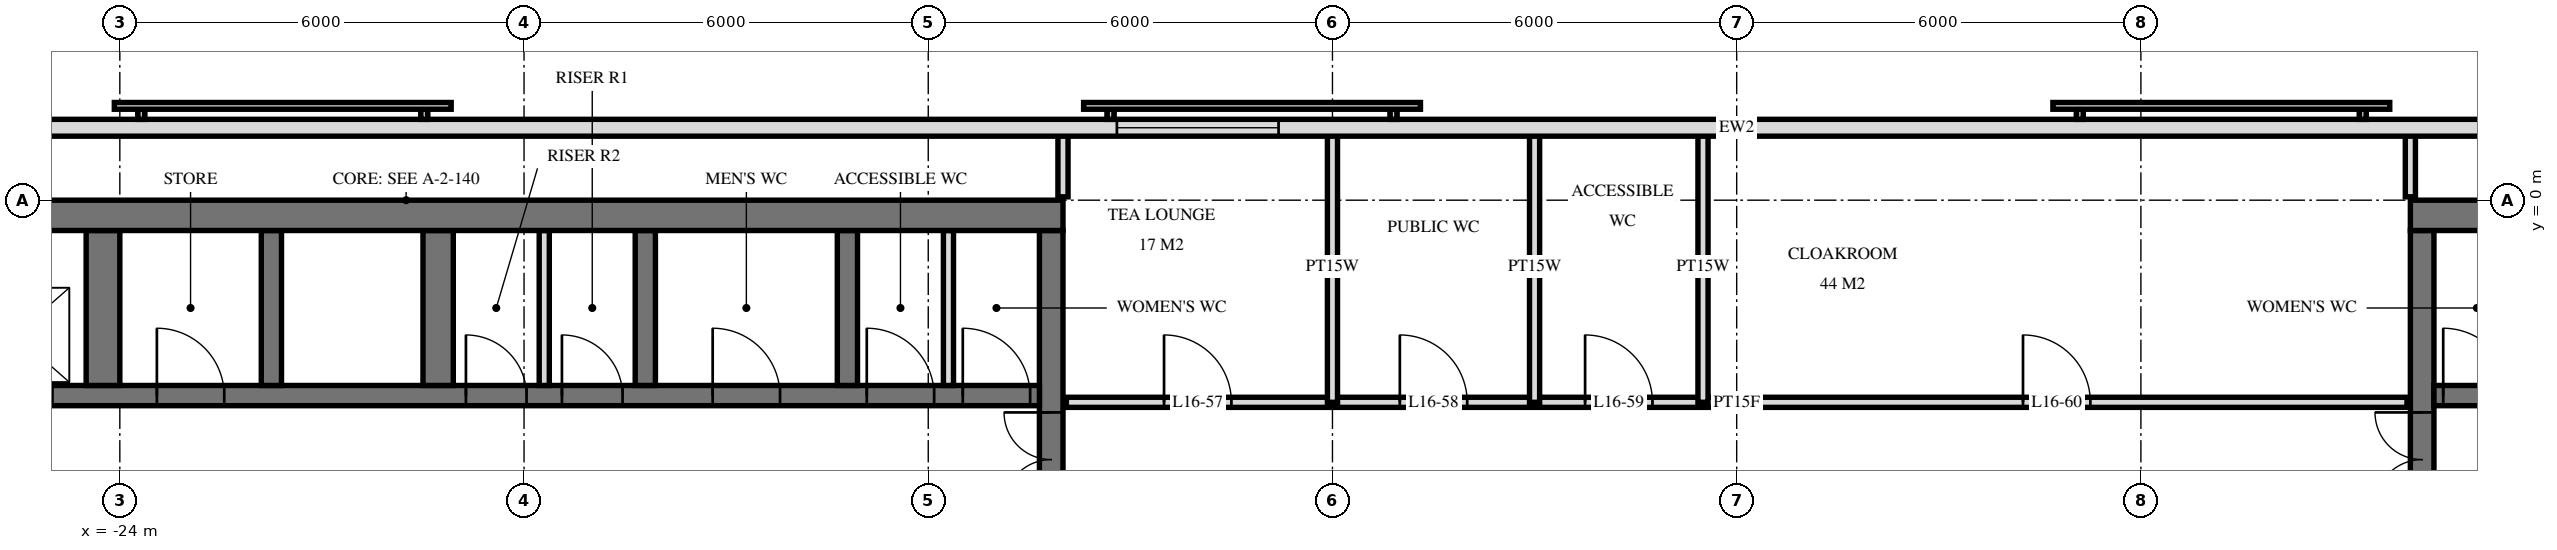
"""IFC4 building model, lengths in metres.
Left out: names, types, materials, properties, quantities, classifications, styles, units other than length and angle.
Written with IfcOpenShell. Run it as: python <this file> out.ifc"""

import sys

from ifc_helpers import new_model, si_unit, direction, frame, frame_2d, origin, place, context, subcontext, project, spatial, rectangle, extrude, element, fill, save


model = new_model("IFC4")
c1 = context("Model", 3, precision=1e-05, world=origin(), true_north=direction((0.0, 1.0)))
c2 = subcontext(c1, "Body", "Model", "MODEL_VIEW")
j1 = project(units=[si_unit("LENGTHUNIT", "METRE"), si_unit("PLANEANGLEUNIT", "RADIAN")], contexts=[c1])
p1 = place(None, origin())
s1 = spatial("IfcSite", under=j1, at=p1, CompositionType="ELEMENT")
p2 = place(p1, origin())
s2 = spatial("IfcBuilding", under=s1, at=p2, CompositionType="ELEMENT")
p3 = place(p2, frame((0.0, 0.0, 67.2)))
s3 = spatial("IfcBuildingStorey", under=s2, at=p3, CompositionType="ELEMENT", Elevation=67.2)
p4 = place(p3, frame((-29.5, -0.225, 0.0), z_axis=(0.0, 0.0, 1.0), x_axis=(1.0, 0.0, 0.0)))
e1 = element("IfcWall", 1, at=p4, inside=s3, PredefinedType="SHEAR", context=c2, shape_type="SweptSolid", body=[
    extrude(rectangle(XDim=19.5, YDim=0.45, at=frame_2d((9.75, 0.0))), origin(), (0.0, 0.0, 1.0), 3.6),
])
p5 = place(p3, frame((-10.175, -14.55, 0.0), z_axis=(0.0, 0.0, 1.0), x_axis=(0.0, 1.0, 0.0)))
e2 = element("IfcWall", 2, at=p5, inside=s3, PredefinedType="SHEAR", context=c2, shape_type="SweptSolid", body=[
    extrude(rectangle(XDim=14.1, YDim=0.35, at=frame_2d((7.05, 0.0))), origin(), (0.0, 0.0, 1.0), 3.6),
])
p6 = place(p5, frame((8.4, 0.0, 0.0)))
e3 = element("IfcOpeningElement", 3, at=p6, cuts=e2, PredefinedType="OPENING", context=c2, shape_type="SweptSolid", body=[
    extrude(rectangle(XDim=1.4, YDim=2.4, at=frame_2d((0.7, 1.2))), frame((0.0, 0.185, 0.0), z_axis=(0.0, -1.0, 0.0), x_axis=(1.0, 0.0, 0.0)), (0.0, 0.0, 1.0), 0.37),
])
p7 = place(p5, frame((10.0, 0.0, 0.0)))
e4 = element("IfcOpeningElement", 4, at=p7, cuts=e2, PredefinedType="OPENING", context=c2, shape_type="SweptSolid", body=[
    extrude(rectangle(XDim=1.4, YDim=2.4, at=frame_2d((0.7, 1.2))), frame((0.0, 0.185, 0.0), z_axis=(0.0, -1.0, 0.0), x_axis=(1.0, 0.0, 0.0)), (0.0, 0.0, 1.0), 0.37),
])
p8 = place(p5, frame((4.0, 0.0, 0.0)))
e5 = element("IfcOpeningElement", 5, at=p8, cuts=e2, PredefinedType="OPENING", context=c2, shape_type="SweptSolid", body=[
    extrude(rectangle(XDim=1.2, YDim=2.1, at=frame_2d((0.6, 1.05))), frame((0.0, 0.185, 0.0), z_axis=(0.0, -1.0, 0.0), x_axis=(1.0, 0.0, 0.0)), (0.0, 0.0, 1.0), 0.37),
])
p9 = place(p3, frame((-29.05, -2.9, 0.0), z_axis=(0.0, 0.0, 1.0), x_axis=(1.0, 0.0, 0.0)))
e6 = element("IfcWall", 6, at=p9, inside=s3, PredefinedType="SHEAR", context=c2, shape_type="SweptSolid", body=[
    extrude(rectangle(XDim=18.7, YDim=0.3, at=frame_2d((9.35, 0.0))), origin(), (0.0, 0.0, 1.0), 3.6),
])
p10 = place(p9, frame((2.95, 0.0, 0.0)))
e7 = element("IfcOpeningElement", 7, at=p10, cuts=e6, PredefinedType="OPENING", context=c2, shape_type="SweptSolid", body=[
    extrude(rectangle(XDim=1.1, YDim=2.1, at=frame_2d((0.55, 1.05))), frame((0.0, 0.16, 0.0), z_axis=(0.0, -1.0, 0.0), x_axis=(1.0, 0.0, 0.0)), (0.0, 0.0, 1.0), 0.32),
])
p11 = place(p9, frame((0.55, 0.0, 0.0)))
e8 = element("IfcOpeningElement", 8, at=p11, cuts=e6, PredefinedType="OPENING", context=c2, shape_type="SweptSolid", body=[
    extrude(rectangle(XDim=1.1, YDim=2.1, at=frame_2d((0.55, 1.05))), frame((0.0, 0.16, 0.0), z_axis=(0.0, -1.0, 0.0), x_axis=(1.0, 0.0, 0.0)), (0.0, 0.0, 1.0), 0.32),
])
p12 = place(p9, frame((11.613, 0.0, 0.0)))
e9 = element("IfcOpeningElement", 9, at=p12, cuts=e6, PredefinedType="OPENING", context=c2, shape_type="SweptSolid", body=[
    extrude(rectangle(XDim=0.9, YDim=2.1, at=frame_2d((0.45, 1.05))), frame((0.0, 0.16, 0.0), z_axis=(0.0, -1.0, 0.0), x_axis=(1.0, 0.0, 0.0)), (0.0, 0.0, 1.0), 0.32),
])
p13 = place(p9, frame((10.188, 0.0, 0.0)))
e10 = element("IfcOpeningElement", 10, at=p13, cuts=e6, PredefinedType="OPENING", context=c2, shape_type="SweptSolid", body=[
    extrude(rectangle(XDim=0.9, YDim=2.1, at=frame_2d((0.45, 1.05))), frame((0.0, 0.16, 0.0), z_axis=(0.0, -1.0, 0.0), x_axis=(1.0, 0.0, 0.0)), (0.0, 0.0, 1.0), 0.32),
])
p14 = place(p9, frame((17.562, 0.0, 0.0)))
e11 = element("IfcOpeningElement", 11, at=p14, cuts=e6, PredefinedType="OPENING", context=c2, shape_type="SweptSolid", body=[
    extrude(rectangle(XDim=1.0, YDim=2.1, at=frame_2d((0.5, 1.05))), frame((0.0, 0.16, 0.0), z_axis=(0.0, -1.0, 0.0), x_axis=(1.0, 0.0, 0.0)), (0.0, 0.0, 1.0), 0.32),
])
p15 = place(p9, frame((16.137, 0.0, 0.0)))
e12 = element("IfcOpeningElement", 12, at=p15, cuts=e6, PredefinedType="OPENING", context=c2, shape_type="SweptSolid", body=[
    extrude(rectangle(XDim=1.0, YDim=2.1, at=frame_2d((0.5, 1.05))), frame((0.0, 0.16, 0.0), z_axis=(0.0, -1.0, 0.0), x_axis=(1.0, 0.0, 0.0)), (0.0, 0.0, 1.0), 0.32),
])
p16 = place(p9, frame((13.85, 0.0, 0.0)))
e13 = element("IfcOpeningElement", 13, at=p16, cuts=e6, PredefinedType="OPENING", context=c2, shape_type="SweptSolid", body=[
    extrude(rectangle(XDim=1.0, YDim=2.1, at=frame_2d((0.5, 1.05))), frame((0.0, 0.16, 0.0), z_axis=(0.0, -1.0, 0.0), x_axis=(1.0, 0.0, 0.0)), (0.0, 0.0, 1.0), 0.32),
])
p17 = place(p9, frame((5.6, 0.0, 0.0)))
e14 = element("IfcOpeningElement", 14, at=p17, cuts=e6, PredefinedType="OPENING", context=c2, shape_type="SweptSolid", body=[
    extrude(rectangle(XDim=1.0, YDim=2.1, at=frame_2d((0.5, 1.05))), frame((0.0, 0.16, 0.0), z_axis=(0.0, -1.0, 0.0), x_axis=(1.0, 0.0, 0.0)), (0.0, 0.0, 1.0), 0.32),
])
for number, where, z_axis, x_axis in (
    (15, (-13.2, -2.75, 0.0), (0.0, 0.0, 1.0), (0.0, 1.0, 0.0)),
    (16, (-16.2, -2.75, 0.0), (0.0, 0.0, 1.0), (0.0, 1.0, 0.0)),
):
    element("IfcWall", number, at=place(p3, frame(where, z_axis=z_axis, x_axis=x_axis)), inside=s3, PredefinedType="SHEAR", context=c2, shape_type="SweptSolid", body=[
        extrude(rectangle(XDim=2.3, YDim=0.3, at=frame_2d((1.15, 0.0))), origin(), (0.0, 0.0, 1.0), 3.6),
    ])
p18 = place(p3, frame((-19.275, -2.75, 0.0), z_axis=(0.0, 0.0, 1.0), x_axis=(0.0, 1.0, 0.0)))
e17 = element("IfcWall", 17, at=p18, inside=s3, PredefinedType="SHEAR", context=c2, shape_type="SweptSolid", body=[
    extrude(rectangle(XDim=2.3, YDim=0.45, at=frame_2d((1.15, 0.0))), origin(), (0.0, 0.0, 1.0), 3.6),
])
p19 = place(p3, frame((-21.75, -2.75, 0.0), z_axis=(0.0, 0.0, 1.0), x_axis=(0.0, 1.0, 0.0)))
e18 = element("IfcWall", 18, at=p19, inside=s3, PredefinedType="SHEAR", context=c2, shape_type="SweptSolid", body=[
    extrude(rectangle(XDim=2.3, YDim=0.3, at=frame_2d((1.15, 0.0))), origin(), (0.0, 0.0, 1.0), 3.6),
])
p20 = place(p3, frame((-24.25, -2.75, 0.0), z_axis=(0.0, 0.0, 1.0), x_axis=(0.0, 1.0, 0.0)))
e19 = element("IfcWall", 19, at=p20, inside=s3, PredefinedType="SHEAR", context=c2, shape_type="SweptSolid", body=[
    extrude(rectangle(XDim=2.3, YDim=0.5, at=frame_2d((1.15, 0.0))), origin(), (0.0, 0.0, 1.0), 3.6),
])
p21 = place(p3, frame((10.0, -0.225, 0.0), z_axis=(0.0, 0.0, 1.0), x_axis=(1.0, 0.0, 0.0)))
e20 = element("IfcWall", 20, at=p21, inside=s3, PredefinedType="SHEAR", context=c2, shape_type="SweptSolid", body=[
    extrude(rectangle(XDim=19.5, YDim=0.45, at=frame_2d((9.75, 0.0))), origin(), (0.0, 0.0, 1.0), 3.6),
])
p22 = place(p3, frame((10.175, -14.55, 0.0), z_axis=(0.0, 0.0, 1.0), x_axis=(0.0, 1.0, 0.0)))
e21 = element("IfcWall", 21, at=p22, inside=s3, PredefinedType="SHEAR", context=c2, shape_type="SweptSolid", body=[
    extrude(rectangle(XDim=14.1, YDim=0.35, at=frame_2d((7.05, 0.0))), origin(), (0.0, 0.0, 1.0), 3.6),
])
p23 = place(p22, frame((8.4, 0.0, 0.0)))
e22 = element("IfcOpeningElement", 22, at=p23, cuts=e21, PredefinedType="OPENING", context=c2, shape_type="SweptSolid", body=[
    extrude(rectangle(XDim=1.4, YDim=2.4, at=frame_2d((0.7, 1.2))), frame((0.0, 0.185, 0.0), z_axis=(0.0, -1.0, 0.0), x_axis=(1.0, 0.0, 0.0)), (0.0, 0.0, 1.0), 0.37),
])
p24 = place(p22, frame((10.0, 0.0, 0.0)))
e23 = element("IfcOpeningElement", 23, at=p24, cuts=e21, PredefinedType="OPENING", context=c2, shape_type="SweptSolid", body=[
    extrude(rectangle(XDim=1.4, YDim=2.4, at=frame_2d((0.7, 1.2))), frame((0.0, 0.185, 0.0), z_axis=(0.0, -1.0, 0.0), x_axis=(1.0, 0.0, 0.0)), (0.0, 0.0, 1.0), 0.37),
])
p25 = place(p22, frame((4.0, 0.0, 0.0)))
e24 = element("IfcOpeningElement", 24, at=p25, cuts=e21, PredefinedType="OPENING", context=c2, shape_type="SweptSolid", body=[
    extrude(rectangle(XDim=1.2, YDim=2.1, at=frame_2d((0.6, 1.05))), frame((0.0, 0.185, 0.0), z_axis=(0.0, -1.0, 0.0), x_axis=(1.0, 0.0, 0.0)), (0.0, 0.0, 1.0), 0.37),
])
p26 = place(p3, frame((10.35, -2.9, 0.0), z_axis=(0.0, 0.0, 1.0), x_axis=(1.0, 0.0, 0.0)))
e25 = element("IfcWall", 25, at=p26, inside=s3, PredefinedType="SHEAR", context=c2, shape_type="SweptSolid", body=[
    extrude(rectangle(XDim=18.7, YDim=0.3, at=frame_2d((9.35, 0.0))), origin(), (0.0, 0.0, 1.0), 3.6),
])
p27 = place(p26, frame((14.65, 0.0, 0.0)))
e26 = element("IfcOpeningElement", 26, at=p27, cuts=e25, PredefinedType="OPENING", context=c2, shape_type="SweptSolid", body=[
    extrude(rectangle(XDim=1.1, YDim=2.1, at=frame_2d((0.55, 1.05))), frame((0.0, 0.16, 0.0), z_axis=(0.0, -1.0, 0.0), x_axis=(1.0, 0.0, 0.0)), (0.0, 0.0, 1.0), 0.32),
])
p28 = place(p26, frame((17.05, 0.0, 0.0)))
e27 = element("IfcOpeningElement", 27, at=p28, cuts=e25, PredefinedType="OPENING", context=c2, shape_type="SweptSolid", body=[
    extrude(rectangle(XDim=1.1, YDim=2.1, at=frame_2d((0.55, 1.05))), frame((0.0, 0.16, 0.0), z_axis=(0.0, -1.0, 0.0), x_axis=(1.0, 0.0, 0.0)), (0.0, 0.0, 1.0), 0.32),
])
p29 = place(p26, frame((6.188, 0.0, 0.0)))
e28 = element("IfcOpeningElement", 28, at=p29, cuts=e25, PredefinedType="OPENING", context=c2, shape_type="SweptSolid", body=[
    extrude(rectangle(XDim=0.9, YDim=2.1, at=frame_2d((0.45, 1.05))), frame((0.0, 0.16, 0.0), z_axis=(0.0, -1.0, 0.0), x_axis=(1.0, 0.0, 0.0)), (0.0, 0.0, 1.0), 0.32),
])
p30 = place(p26, frame((7.613, 0.0, 0.0)))
e29 = element("IfcOpeningElement", 29, at=p30, cuts=e25, PredefinedType="OPENING", context=c2, shape_type="SweptSolid", body=[
    extrude(rectangle(XDim=0.9, YDim=2.1, at=frame_2d((0.45, 1.05))), frame((0.0, 0.16, 0.0), z_axis=(0.0, -1.0, 0.0), x_axis=(1.0, 0.0, 0.0)), (0.0, 0.0, 1.0), 0.32),
])
p31 = place(p26, frame((0.137, 0.0, 0.0)))
e30 = element("IfcOpeningElement", 30, at=p31, cuts=e25, PredefinedType="OPENING", context=c2, shape_type="SweptSolid", body=[
    extrude(rectangle(XDim=1.0, YDim=2.1, at=frame_2d((0.5, 1.05))), frame((0.0, 0.16, 0.0), z_axis=(0.0, -1.0, 0.0), x_axis=(1.0, 0.0, 0.0)), (0.0, 0.0, 1.0), 0.32),
])
p32 = place(p26, frame((1.562, 0.0, 0.0)))
e31 = element("IfcOpeningElement", 31, at=p32, cuts=e25, PredefinedType="OPENING", context=c2, shape_type="SweptSolid", body=[
    extrude(rectangle(XDim=1.0, YDim=2.1, at=frame_2d((0.5, 1.05))), frame((0.0, 0.16, 0.0), z_axis=(0.0, -1.0, 0.0), x_axis=(1.0, 0.0, 0.0)), (0.0, 0.0, 1.0), 0.32),
])
p33 = place(p26, frame((3.85, 0.0, 0.0)))
e32 = element("IfcOpeningElement", 32, at=p33, cuts=e25, PredefinedType="OPENING", context=c2, shape_type="SweptSolid", body=[
    extrude(rectangle(XDim=1.0, YDim=2.1, at=frame_2d((0.5, 1.05))), frame((0.0, 0.16, 0.0), z_axis=(0.0, -1.0, 0.0), x_axis=(1.0, 0.0, 0.0)), (0.0, 0.0, 1.0), 0.32),
])
p34 = place(p26, frame((12.1, 0.0, 0.0)))
e33 = element("IfcOpeningElement", 33, at=p34, cuts=e25, PredefinedType="OPENING", context=c2, shape_type="SweptSolid", body=[
    extrude(rectangle(XDim=1.0, YDim=2.1, at=frame_2d((0.5, 1.05))), frame((0.0, 0.16, 0.0), z_axis=(0.0, -1.0, 0.0), x_axis=(1.0, 0.0, 0.0)), (0.0, 0.0, 1.0), 0.32),
])
p35 = place(p3, frame((28.775, 1.075, 0.0), z_axis=(0.0, 0.0, 1.0), x_axis=(-1.0, 0.0, 0.0)))
e34 = element("IfcWall", 34, at=p35, inside=s3, PredefinedType="SOLIDWALL", context=c2, shape_type="SweptSolid", body=[
    extrude(rectangle(XDim=57.551, YDim=0.25, at=frame_2d((28.775, 0.0))), origin(), (0.0, 0.0, 1.0), 3.32),
])
p36 = place(p35, frame((35.575, 0.0, 0.3)))
e35 = element("IfcOpeningElement", 35, at=p36, cuts=e34, PredefinedType="OPENING", context=c2, shape_type="SweptSolid", body=[
    extrude(rectangle(XDim=2.4, YDim=2.1, at=frame_2d((1.2, 1.05))), frame((0.0, 0.135, 0.0), z_axis=(0.0, -1.0, 0.0), x_axis=(1.0, 0.0, 0.0)), (0.0, 0.0, 1.0), 0.27),
])
for number, where, z_axis, x_axis in (
    (36, (-17.7, -2.75, 0.0), (0.0, 0.0, 1.0), (0.0, 1.0, 0.0)),
    (37, (-11.7, -2.75, 0.0), (0.0, 0.0, 1.0), (0.0, 1.0, 0.0)),
):
    element("IfcWall", number, at=place(p3, frame(where, z_axis=z_axis, x_axis=x_axis)), inside=s3, PredefinedType="PARTITIONING", context=c2, shape_type="SweptSolid", body=[
        extrude(rectangle(XDim=2.3, YDim=0.15, at=frame_2d((1.15, 0.0))), origin(), (0.0, 0.0, 1.0), 3.3),
    ])
p37 = place(p3, frame((10.0, 0.05, 0.0), z_axis=(0.0, 0.0, 1.0), x_axis=(0.0, 1.0, 0.0)))
e38 = element("IfcWall", 38, at=p37, inside=s3, PredefinedType="PARTITIONING", context=c2, shape_type="SweptSolid", body=[
    extrude(rectangle(XDim=0.97, YDim=0.15, at=frame_2d((0.485, 0.0))), origin(), (0.0, 0.0, 1.0), 3.32),
])
for number, where, z_axis, x_axis in (
    (39, (-0.5, -3.0, 0.0), (0.0, 0.0, 1.0), (0.0, 1.0, 0.0)),
    (40, (-3.0, -3.0, 0.0), (0.0, 0.0, 1.0), (0.0, 1.0, 0.0)),
    (41, (-6.0, -3.0, 0.0), (0.0, 0.0, 1.0), (0.0, 1.0, 0.0)),
):
    element("IfcWall", number, at=place(p3, frame(where, z_axis=z_axis, x_axis=x_axis)), inside=s3, PredefinedType="PLUMBINGWALL", context=c2, shape_type="SweptSolid", body=[
        extrude(rectangle(XDim=4.02, YDim=0.15, at=frame_2d((2.01, 0.0))), origin(), (0.0, 0.0, 1.0), 3.32),
    ])
p38 = place(p3, frame((-10.0, 0.05, 0.0), z_axis=(0.0, 0.0, 1.0), x_axis=(0.0, 1.0, 0.0)))
e42 = element("IfcWall", 42, at=p38, inside=s3, PredefinedType="PARTITIONING", context=c2, shape_type="SweptSolid", body=[
    extrude(rectangle(XDim=0.97, YDim=0.15, at=frame_2d((0.485, 0.0))), origin(), (0.0, 0.0, 1.0), 3.32),
])
p39 = place(p3, frame((-9.95, -3.0, 0.0), z_axis=(0.0, 0.0, 1.0), x_axis=(1.0, 0.0, 0.0)))
e43 = element("IfcWall", 43, at=p39, inside=s3, PredefinedType="PARTITIONING", context=c2, shape_type="SweptSolid", body=[
    extrude(rectangle(XDim=19.9, YDim=0.15, at=frame_2d((9.95, 0.0))), origin(), (0.0, 0.0, 1.0), 3.32),
])
p40 = place(p39, frame((1.45, 0.0, 0.0)))
e44 = element("IfcOpeningElement", 44, at=p40, cuts=e43, PredefinedType="OPENING", context=c2, shape_type="SweptSolid", body=[
    extrude(rectangle(XDim=1.0, YDim=2.1, at=frame_2d((0.5, 1.05))), frame((0.0, 0.085, 0.0), z_axis=(0.0, -1.0, 0.0), x_axis=(1.0, 0.0, 0.0)), (0.0, 0.0, 1.0), 0.17),
])
p41 = place(p39, frame((4.95, 0.0, 0.0)))
e45 = element("IfcOpeningElement", 45, at=p41, cuts=e43, PredefinedType="OPENING", context=c2, shape_type="SweptSolid", body=[
    extrude(rectangle(XDim=1.0, YDim=2.1, at=frame_2d((0.5, 1.05))), frame((0.0, 0.085, 0.0), z_axis=(0.0, -1.0, 0.0), x_axis=(1.0, 0.0, 0.0)), (0.0, 0.0, 1.0), 0.17),
])
p42 = place(p39, frame((7.7, 0.0, 0.0)))
e46 = element("IfcOpeningElement", 46, at=p42, cuts=e43, PredefinedType="OPENING", context=c2, shape_type="SweptSolid", body=[
    extrude(rectangle(XDim=1.0, YDim=2.1, at=frame_2d((0.5, 1.05))), frame((0.0, 0.085, 0.0), z_axis=(0.0, -1.0, 0.0), x_axis=(1.0, 0.0, 0.0)), (0.0, 0.0, 1.0), 0.17),
])
p43 = place(p39, frame((14.2, 0.0, 0.0)))
e47 = element("IfcOpeningElement", 47, at=p43, cuts=e43, PredefinedType="OPENING", context=c2, shape_type="SweptSolid", body=[
    extrude(rectangle(XDim=1.0, YDim=2.1, at=frame_2d((0.5, 1.05))), frame((0.0, 0.085, 0.0), z_axis=(0.0, -1.0, 0.0), x_axis=(1.0, 0.0, 0.0)), (0.0, 0.0, 1.0), 0.17),
])
p44 = place(p36, origin())
e48 = element("IfcWindow", 48, at=p44, inside=s3, PartitioningType="SINGLE_PANEL", PredefinedType="WINDOW", context=c2, shape_type="SweptSolid", body=[
    extrude(rectangle(XDim=2.4, YDim=2.1, at=frame_2d((1.2, 1.05))), frame((0.0, 0.03, 0.0), z_axis=(0.0, -1.0, 0.0), x_axis=(1.0, 0.0, 0.0)), (0.0, 0.0, 1.0), 0.06),
])
fill(e35, e48)
p45 = place(p7, origin())
e49 = element("IfcDoor", 49, at=p45, inside=s3, OperationType="DOUBLE_DOOR_SINGLE_SWING", PredefinedType="DOOR", context=c2, shape_type="SweptSolid", body=[
    extrude(rectangle(XDim=1.4, YDim=2.4, at=frame_2d((0.7, 1.2))), frame((0.0, 0.025, 0.0), z_axis=(0.0, -1.0, 0.0), x_axis=(1.0, 0.0, 0.0)), (0.0, 0.0, 1.0), 0.05),
])
fill(e4, e49)
p46 = place(p12, origin())
e50 = element("IfcDoor", 50, at=p46, inside=s3, OperationType="SINGLE_SWING_RIGHT", PredefinedType="DOOR", context=c2, shape_type="SweptSolid", body=[
    extrude(rectangle(XDim=0.9, YDim=2.1, at=frame_2d((0.45, 1.05))), frame((0.0, 0.025, 0.0), z_axis=(0.0, -1.0, 0.0), x_axis=(1.0, 0.0, 0.0)), (0.0, 0.0, 1.0), 0.05),
])
fill(e9, e50)
p47 = place(p13, origin())
e51 = element("IfcDoor", 51, at=p47, inside=s3, OperationType="SINGLE_SWING_RIGHT", PredefinedType="DOOR", context=c2, shape_type="SweptSolid", body=[
    extrude(rectangle(XDim=0.9, YDim=2.1, at=frame_2d((0.45, 1.05))), frame((0.0, 0.025, 0.0), z_axis=(0.0, -1.0, 0.0), x_axis=(1.0, 0.0, 0.0)), (0.0, 0.0, 1.0), 0.05),
])
fill(e10, e51)
p48 = place(p14, origin())
e52 = element("IfcDoor", 52, at=p48, inside=s3, OperationType="SINGLE_SWING_RIGHT", PredefinedType="DOOR", context=c2, shape_type="SweptSolid", body=[
    extrude(rectangle(XDim=1.0, YDim=2.1, at=frame_2d((0.5, 1.05))), frame((0.0, 0.025, 0.0), z_axis=(0.0, -1.0, 0.0), x_axis=(1.0, 0.0, 0.0)), (0.0, 0.0, 1.0), 0.05),
])
fill(e11, e52)
p49 = place(p15, origin())
e53 = element("IfcDoor", 53, at=p49, inside=s3, OperationType="SINGLE_SWING_RIGHT", PredefinedType="DOOR", context=c2, shape_type="SweptSolid", body=[
    extrude(rectangle(XDim=1.0, YDim=2.1, at=frame_2d((0.5, 1.05))), frame((0.0, 0.025, 0.0), z_axis=(0.0, -1.0, 0.0), x_axis=(1.0, 0.0, 0.0)), (0.0, 0.0, 1.0), 0.05),
])
fill(e12, e53)
p50 = place(p16, origin())
e54 = element("IfcDoor", 54, at=p50, inside=s3, OperationType="SINGLE_SWING_RIGHT", PredefinedType="DOOR", context=c2, shape_type="SweptSolid", body=[
    extrude(rectangle(XDim=1.0, YDim=2.1, at=frame_2d((0.5, 1.05))), frame((0.0, 0.025, 0.0), z_axis=(0.0, -1.0, 0.0), x_axis=(1.0, 0.0, 0.0)), (0.0, 0.0, 1.0), 0.05),
])
fill(e13, e54)
p51 = place(p17, origin())
e55 = element("IfcDoor", 55, at=p51, inside=s3, OperationType="SINGLE_SWING_RIGHT", PredefinedType="DOOR", context=c2, shape_type="SweptSolid", body=[
    extrude(rectangle(XDim=1.0, YDim=2.1, at=frame_2d((0.5, 1.05))), frame((0.0, 0.025, 0.0), z_axis=(0.0, -1.0, 0.0), x_axis=(1.0, 0.0, 0.0)), (0.0, 0.0, 1.0), 0.05),
])
fill(e14, e55)
p52 = place(p24, origin())
e56 = element("IfcDoor", 56, at=p52, inside=s3, OperationType="DOUBLE_DOOR_SINGLE_SWING", PredefinedType="DOOR", context=c2, shape_type="SweptSolid", body=[
    extrude(rectangle(XDim=1.4, YDim=2.4, at=frame_2d((0.7, 1.2))), frame((0.0, 0.025, 0.0), z_axis=(0.0, -1.0, 0.0), x_axis=(1.0, 0.0, 0.0)), (0.0, 0.0, 1.0), 0.05),
])
fill(e23, e56)
p53 = place(p31, origin())
e57 = element("IfcDoor", 57, at=p53, inside=s3, OperationType="SINGLE_SWING_RIGHT", PredefinedType="DOOR", context=c2, shape_type="SweptSolid", body=[
    extrude(rectangle(XDim=1.0, YDim=2.1, at=frame_2d((0.5, 1.05))), frame((0.0, 0.025, 0.0), z_axis=(0.0, -1.0, 0.0), x_axis=(1.0, 0.0, 0.0)), (0.0, 0.0, 1.0), 0.05),
])
fill(e30, e57)
p54 = place(p40, origin())
e58 = element("IfcDoor", 58, at=p54, inside=s3, OperationType="SINGLE_SWING_RIGHT", PredefinedType="DOOR", context=c2, shape_type="SweptSolid", body=[
    extrude(rectangle(XDim=1.0, YDim=2.1, at=frame_2d((0.5, 1.05))), frame((0.0, 0.025, 0.0), z_axis=(0.0, -1.0, 0.0), x_axis=(1.0, 0.0, 0.0)), (0.0, 0.0, 1.0), 0.05),
])
fill(e44, e58)
p55 = place(p41, origin())
e59 = element("IfcDoor", 59, at=p55, inside=s3, OperationType="SINGLE_SWING_RIGHT", PredefinedType="DOOR", context=c2, shape_type="SweptSolid", body=[
    extrude(rectangle(XDim=1.0, YDim=2.1, at=frame_2d((0.5, 1.05))), frame((0.0, 0.025, 0.0), z_axis=(0.0, -1.0, 0.0), x_axis=(1.0, 0.0, 0.0)), (0.0, 0.0, 1.0), 0.05),
])
fill(e45, e59)
p56 = place(p42, origin())
e60 = element("IfcDoor", 60, at=p56, inside=s3, OperationType="SINGLE_SWING_RIGHT", PredefinedType="DOOR", context=c2, shape_type="SweptSolid", body=[
    extrude(rectangle(XDim=1.0, YDim=2.1, at=frame_2d((0.5, 1.05))), frame((0.0, 0.025, 0.0), z_axis=(0.0, -1.0, 0.0), x_axis=(1.0, 0.0, 0.0)), (0.0, 0.0, 1.0), 0.05),
])
fill(e46, e60)
p57 = place(p43, origin())
e61 = element("IfcDoor", 61, at=p57, inside=s3, OperationType="SINGLE_SWING_RIGHT", PredefinedType="DOOR", context=c2, shape_type="SweptSolid", body=[
    extrude(rectangle(XDim=1.0, YDim=2.1, at=frame_2d((0.5, 1.05))), frame((0.0, 0.025, 0.0), z_axis=(0.0, -1.0, 0.0), x_axis=(1.0, 0.0, 0.0)), (0.0, 0.0, 1.0), 0.05),
])
fill(e47, e61)
save(model, sys.argv[1])
